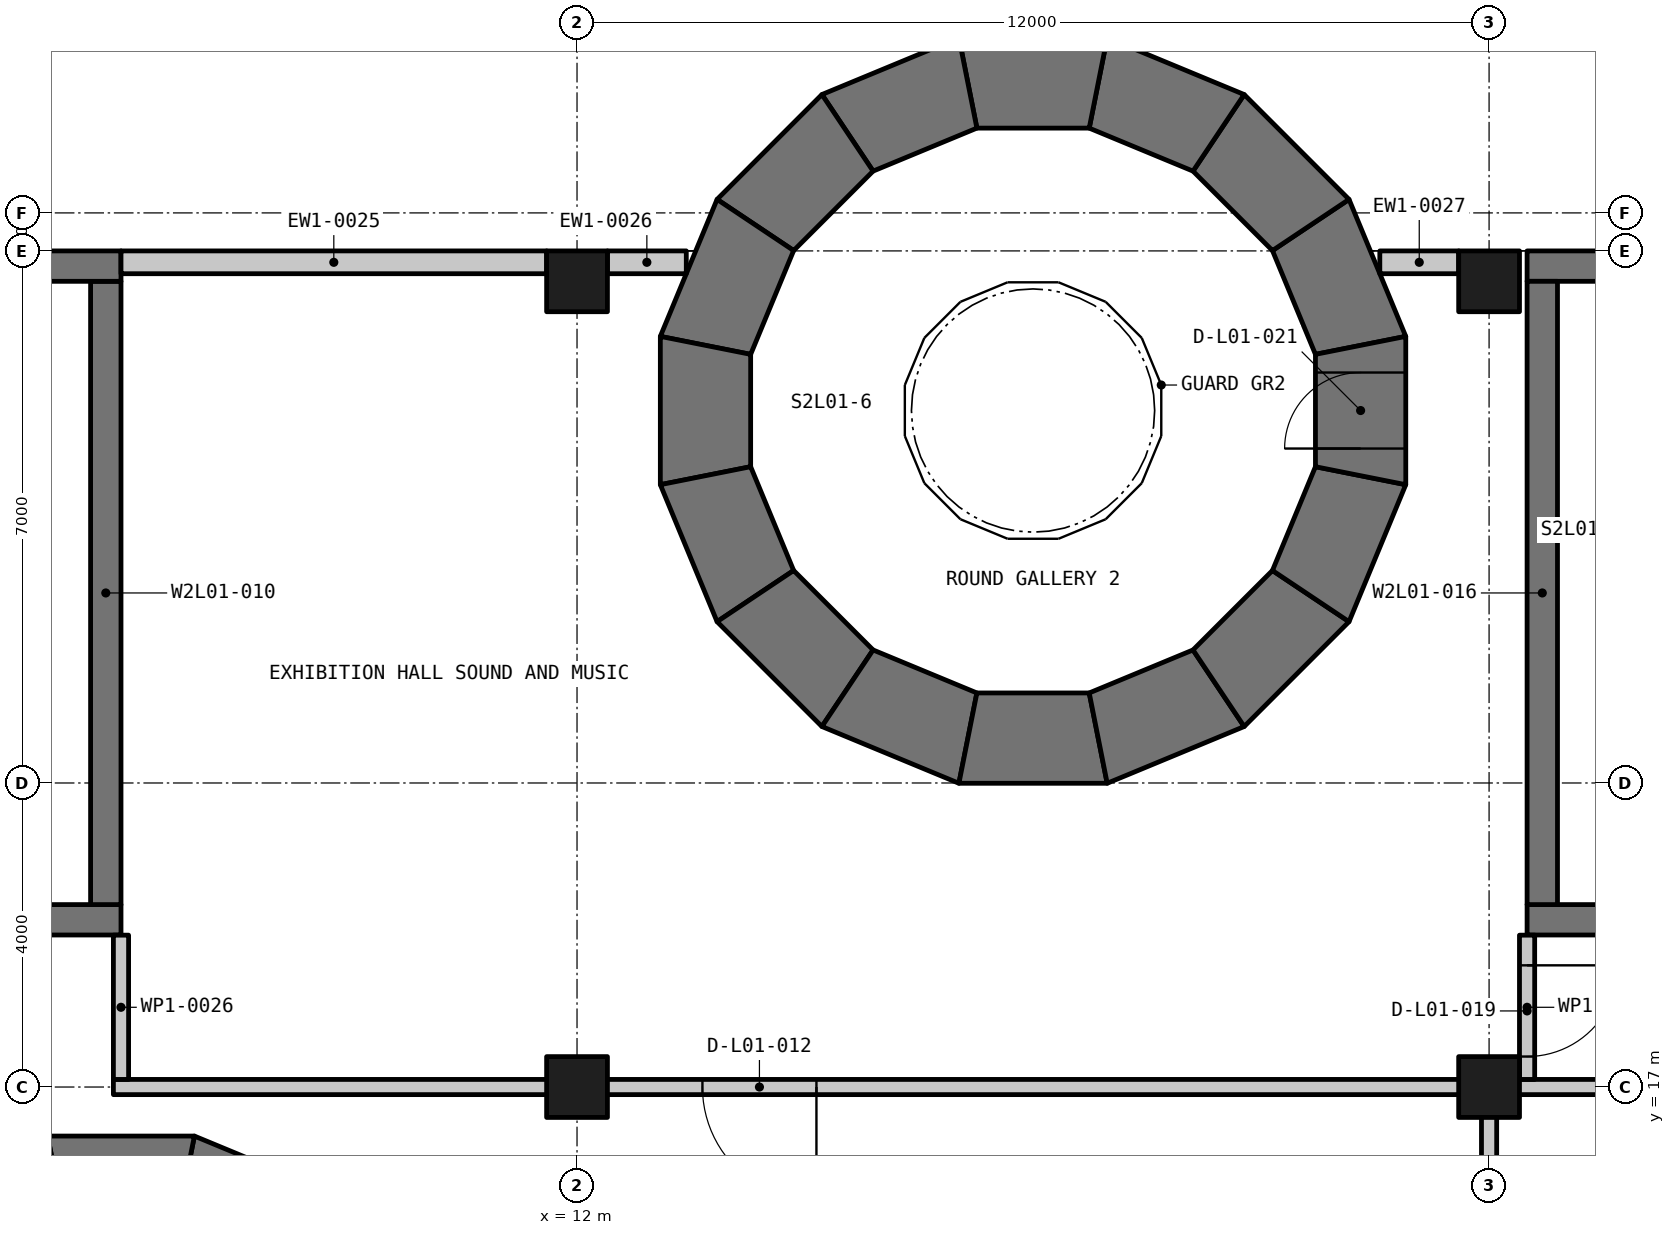
"""IFC4 building model, lengths in metres.
Left out: names, types, materials, properties, quantities, classifications, styles, units other than length and angle.
Written with IfcOpenShell. Run it as: python <this file> out.ifc"""

import sys

from ifc_helpers import new_model, si_unit, direction, frame, frame_2d, origin, origin_2d, place, context, subcontext, project, spatial, polyline, rectangle, outline, extrude, element, fill, save


model = new_model("IFC4")
c1 = context("Model", 3, precision=1e-05, world=origin(), true_north=direction((0.0, 1.0)))
c2 = subcontext(c1, "Body", "Model", "MODEL_VIEW")
j1 = project(units=[si_unit("LENGTHUNIT", "METRE"), si_unit("PLANEANGLEUNIT", "RADIAN")], contexts=[c1])
p1 = place(None, origin())
s1 = spatial("IfcSite", under=j1, at=p1, CompositionType="ELEMENT")
p2 = place(p1, origin())
s2 = spatial("IfcBuilding", under=s1, at=p2, CompositionType="ELEMENT")
p3 = place(p2, frame((0.0, 0.0, 6.0)))
s3 = spatial("IfcBuildingStorey", under=s2, at=p3, CompositionType="ELEMENT", Elevation=6.0)
for number, where, z_axis, x_axis in (
    (1, (12.0, 17.0, -0.3), (0.0, 0.0, 1.0), (1.0, 0.0, 0.0)),
    (2, (12.0, 27.6, -0.3), (0.0, 0.0, 1.0), (1.0, 0.0, 0.0)),
    (3, (24.0, 17.0, -0.3), (0.0, 0.0, 1.0), (1.0, 0.0, 0.0)),
    (4, (24.0, 27.6, -0.3), (0.0, 0.0, 1.0), (1.0, 0.0, 0.0)),
):
    element("IfcColumn", number, at=place(p3, frame(where, z_axis=z_axis, x_axis=x_axis)), inside=s3, PredefinedType="COLUMN", context=c2, shape_type="SweptSolid", body=[
        extrude(rectangle(XDim=0.8, YDim=0.8, at=origin_2d()), origin(), (0.0, 0.0, 1.0), 5.25),
    ])
p4 = place(p3, frame((8.635, 15.339, -0.3), z_axis=(0.0, 0.0, 1.0), x_axis=(-0.923901292417, 0.382630895081, 0.0)))
e5 = element("IfcWall", 5, at=p4, inside=s3, PredefinedType="SHEAR", context=c2, shape_type="SweptSolid", body=[
    extrude(outline(polyline([(0.0, -0.3), (1.931, -0.3), (1.812, 0.3), (0.119, 0.3), (0.0, -0.3)])), origin(), (0.0, 0.0, 1.0), 5.25),
])
p5 = place(p3, frame((6.966, 16.055, -0.3), z_axis=(0.0, 0.0, 1.0), x_axis=(-1.0, 0.0, 0.0)))
e6 = element("IfcWall", 6, at=p5, inside=s3, PredefinedType="SHEAR", context=c2, shape_type="SweptSolid", body=[
    extrude(outline(polyline([(-0.0, -0.3), (1.931, -0.3), (1.812, 0.3), (0.119, 0.3), (-0.0, -0.3)])), origin(), (0.0, 0.0, 1.0), 5.25),
])
p6 = place(p3, frame((5.149, 16.078, -0.3), z_axis=(0.0, 0.0, 1.0), x_axis=(-0.923901292417, -0.382630895081, 0.0)))
e7 = element("IfcWall", 7, at=p6, inside=s3, PredefinedType="SHEAR", context=c2, shape_type="SweptSolid", body=[
    extrude(outline(polyline([(0.0, -0.3), (1.931, -0.3), (1.812, 0.3), (0.119, 0.3), (0.0, -0.3)])), origin(), (0.0, 0.0, 1.0), 5.25),
])
p7 = place(p3, frame((22.355, 26.648, -0.3), z_axis=(0.0, 0.0, 1.0), x_axis=(-0.382668614316, 0.923885670209, 0.0)))
e8 = element("IfcWall", 8, at=p7, inside=s3, PredefinedType="SHEAR", context=c2, shape_type="SweptSolid", body=[
    extrude(outline(polyline([(0.0, -0.594), (1.951, -0.594), (1.715, 0.594), (0.236, 0.594), (0.0, -0.594)])), origin(), (0.0, 0.0, 1.0), 5.25),
])
p8 = place(p3, frame((21.737, 28.258, -0.3), z_axis=(0.0, 0.0, 1.0), x_axis=(-0.707044208134, 0.707169348702, 0.0)))
e9 = element("IfcWall", 9, at=p8, inside=s3, PredefinedType="SHEAR", context=c2, shape_type="SweptSolid", body=[
    extrude(outline(polyline([(0.0, -0.594), (1.951, -0.594), (1.715, 0.594), (0.236, 0.594), (0.0, -0.594)])), origin(), (0.0, 0.0, 1.0), 5.25),
])
p9 = place(p3, frame((20.551, 29.508, -0.3), z_axis=(0.0, 0.0, 1.0), x_axis=(-0.923885670209, 0.382668614316, 0.0)))
e10 = element("IfcWall", 10, at=p9, inside=s3, PredefinedType="SHEAR", context=c2, shape_type="SweptSolid", body=[
    extrude(outline(polyline([(0.0, -0.594), (1.951, -0.594), (1.715, 0.594), (0.237, 0.594), (0.0, -0.594)])), origin(), (0.0, 0.0, 1.0), 5.25),
])
p10 = place(p3, frame((18.975, 30.21, -0.3), z_axis=(0.0, 0.0, 1.0), x_axis=(-1.0, 0.0, 0.0)))
e11 = element("IfcWall", 11, at=p10, inside=s3, PredefinedType="SHEAR", context=c2, shape_type="SweptSolid", body=[
    extrude(outline(polyline([(-0.0, -0.594), (1.951, -0.594), (1.714, 0.594), (0.236, 0.594), (-0.0, -0.594)])), origin(), (0.0, 0.0, 1.0), 5.25),
])
p11 = place(p3, frame((17.252, 30.255, -0.3), z_axis=(0.0, 0.0, 1.0), x_axis=(-0.923885670209, -0.382668614316, 0.0)))
e12 = element("IfcWall", 12, at=p11, inside=s3, PredefinedType="SHEAR", context=c2, shape_type="SweptSolid", body=[
    extrude(outline(polyline([(0.0, -0.594), (1.951, -0.594), (1.714, 0.594), (0.236, 0.594), (0.0, -0.594)])), origin(), (0.0, 0.0, 1.0), 5.25),
])
p12 = place(p3, frame((15.642, 29.637, -0.3), z_axis=(0.0, 0.0, 1.0), x_axis=(-0.707044208134, -0.707169348702, 0.0)))
e13 = element("IfcWall", 13, at=p12, inside=s3, PredefinedType="SHEAR", context=c2, shape_type="SweptSolid", body=[
    extrude(outline(polyline([(0.0, -0.594), (1.951, -0.594), (1.715, 0.594), (0.236, 0.594), (0.0, -0.594)])), origin(), (0.0, 0.0, 1.0), 5.25),
])
p13 = place(p3, frame((14.392, 28.45, -0.3), z_axis=(0.0, 0.0, 1.0), x_axis=(-0.382668614316, -0.923885670209, 0.0)))
e14 = element("IfcWall", 14, at=p13, inside=s3, PredefinedType="SHEAR", context=c2, shape_type="SweptSolid", body=[
    extrude(outline(polyline([(-0.0, -0.594), (1.951, -0.594), (1.715, 0.594), (0.236, 0.594), (-0.0, -0.594)])), origin(), (0.0, 0.0, 1.0), 5.25),
])
p14 = place(p3, frame((13.69, 26.875, -0.3), z_axis=(0.0, 0.0, 1.0), x_axis=(0.0, -1.0, 0.0)))
e15 = element("IfcWall", 15, at=p14, inside=s3, PredefinedType="SHEAR", context=c2, shape_type="SweptSolid", body=[
    extrude(outline(polyline([(0.0, -0.594), (1.951, -0.594), (1.715, 0.594), (0.237, 0.594), (0.0, -0.594)])), origin(), (0.0, 0.0, 1.0), 5.25),
])
p15 = place(p3, frame((13.645, 25.152, -0.3), z_axis=(0.0, 0.0, 1.0), x_axis=(0.382712860146, -0.923867342576, 0.0)))
e16 = element("IfcWall", 16, at=p15, inside=s3, PredefinedType="SHEAR", context=c2, shape_type="SweptSolid", body=[
    extrude(outline(polyline([(0.0, -0.594), (1.951, -0.594), (1.714, 0.594), (0.236, 0.594), (0.0, -0.594)])), origin(), (0.0, 0.0, 1.0), 5.25),
])
p16 = place(p3, frame((14.263, 23.542, -0.3), z_axis=(0.0, 0.0, 1.0), x_axis=(0.707106781187, -0.707106781187, 0.0)))
e17 = element("IfcWall", 17, at=p16, inside=s3, PredefinedType="SHEAR", context=c2, shape_type="SweptSolid", body=[
    extrude(outline(polyline([(0.0, -0.594), (1.951, -0.594), (1.714, 0.594), (0.236, 0.594), (0.0, -0.594)])), origin(), (0.0, 0.0, 1.0), 5.25),
])
p17 = place(p3, frame((15.449, 22.292, -0.3), z_axis=(0.0, 0.0, 1.0), x_axis=(0.923885670209, -0.382668614316, 0.0)))
e18 = element("IfcWall", 18, at=p17, inside=s3, PredefinedType="SHEAR", context=c2, shape_type="SweptSolid", body=[
    extrude(outline(polyline([(0.0, -0.594), (1.951, -0.594), (1.715, 0.594), (0.237, 0.594), (0.0, -0.594)])), origin(), (0.0, 0.0, 1.0), 5.25),
])
p18 = place(p3, frame((17.025, 21.59, -0.3), z_axis=(0.0, 0.0, 1.0), x_axis=(1.0, 0.0, 0.0)))
e19 = element("IfcWall", 19, at=p18, inside=s3, PredefinedType="SHEAR", context=c2, shape_type="SweptSolid", body=[
    extrude(outline(polyline([(-0.0, -0.594), (1.951, -0.594), (1.714, 0.594), (0.236, 0.594), (-0.0, -0.594)])), origin(), (0.0, 0.0, 1.0), 5.25),
])
p19 = place(p3, frame((18.748, 21.545, -0.3), z_axis=(0.0, 0.0, 1.0), x_axis=(0.923885670209, 0.382668614316, 0.0)))
e20 = element("IfcWall", 20, at=p19, inside=s3, PredefinedType="SHEAR", context=c2, shape_type="SweptSolid", body=[
    extrude(outline(polyline([(0.0, -0.594), (1.951, -0.594), (1.714, 0.594), (0.236, 0.594), (0.0, -0.594)])), origin(), (0.0, 0.0, 1.0), 5.25),
])
p20 = place(p3, frame((20.358, 22.163, -0.3), z_axis=(0.0, 0.0, 1.0), x_axis=(0.707106781187, 0.707106781187, 0.0)))
e21 = element("IfcWall", 21, at=p20, inside=s3, PredefinedType="SHEAR", context=c2, shape_type="SweptSolid", body=[
    extrude(outline(polyline([(0.0, -0.594), (1.951, -0.594), (1.715, 0.594), (0.236, 0.594), (0.0, -0.594)])), origin(), (0.0, 0.0, 1.0), 5.25),
])
p21 = place(p3, frame((21.608, 23.35, -0.3), z_axis=(0.0, 0.0, 1.0), x_axis=(0.382712860146, 0.923867342576, 0.0)))
e22 = element("IfcWall", 22, at=p21, inside=s3, PredefinedType="SHEAR", context=c2, shape_type="SweptSolid", body=[
    extrude(outline(polyline([(-0.0, -0.594), (1.951, -0.594), (1.714, 0.594), (0.236, 0.594), (-0.0, -0.594)])), origin(), (0.0, 0.0, 1.0), 5.25),
])
p22 = place(p3, frame((22.31, 24.925, -0.3), z_axis=(0.0, 0.0, 1.0), x_axis=(0.0, 1.0, 0.0)))
e23 = element("IfcWall", 23, at=p22, inside=s3, PredefinedType="SHEAR", context=c2, shape_type="SweptSolid", body=[
    extrude(outline(polyline([(0.0, -0.594), (1.951, -0.594), (1.714, 0.594), (0.236, 0.594), (0.0, -0.594)])), origin(), (0.0, 0.0, 1.0), 5.25),
])
p23 = place(p22, frame((0.475, 0.0, 0.3)))
e24 = element("IfcOpeningElement", 24, at=p23, cuts=e23, PredefinedType="OPENING", context=c2, shape_type="SweptSolid", body=[
    extrude(rectangle(XDim=1.0, YDim=2.2, at=frame_2d((0.5, 1.1))), frame((0.0, 0.604, 0.0), z_axis=(0.0, -1.0, 0.0), x_axis=(1.0, 0.0, 0.0)), (0.0, 0.0, 1.0), 1.208),
])
p24 = place(p3, frame((0.0, 19.2, -0.3), z_axis=(0.0, 0.0, 1.0), x_axis=(1.0, 0.0, 0.0)))
e25 = element("IfcWall", 25, at=p24, inside=s3, PredefinedType="SHEAR", context=c2, shape_type="SweptSolid", body=[
    extrude(rectangle(XDim=6.0, YDim=0.4, at=frame_2d((3.0, 0.0))), origin(), (0.0, 0.0, 1.0), 5.25),
])
p25 = place(p24, frame((2.399, 0.0, 0.3)))
e26 = element("IfcOpeningElement", 26, at=p25, cuts=e25, PredefinedType="OPENING", context=c2, shape_type="SweptSolid", body=[
    extrude(rectangle(XDim=1.2, YDim=2.2, at=frame_2d((0.6, 1.1))), frame((0.0, 0.21, 0.0), z_axis=(0.0, -1.0, 0.0), x_axis=(1.0, 0.0, 0.0)), (0.0, 0.0, 1.0), 0.42),
])
p26 = place(p3, frame((5.8, 19.4, -0.3), z_axis=(0.0, 0.0, 1.0), x_axis=(0.0, 1.0, 0.0)))
e27 = element("IfcWall", 27, at=p26, inside=s3, PredefinedType="SHEAR", context=c2, shape_type="SweptSolid", body=[
    extrude(rectangle(XDim=8.2, YDim=0.4, at=frame_2d((4.1, 0.0))), origin(), (0.0, 0.0, 1.0), 5.25),
])
p27 = place(p3, frame((0.0, 27.8, -0.3), z_axis=(0.0, 0.0, 1.0), x_axis=(1.0, 0.0, 0.0)))
e28 = element("IfcWall", 28, at=p27, inside=s3, PredefinedType="SHEAR", context=c2, shape_type="SweptSolid", body=[
    extrude(rectangle(XDim=6.0, YDim=0.4, at=frame_2d((3.0, 0.0))), origin(), (0.0, 0.0, 1.0), 5.25),
])
for number, where, z_axis, x_axis in (
    (29, (24.5, 19.2, -0.3), (0.0, 0.0, 1.0), (1.0, 0.0, 0.0)),
    (30, (24.5, 27.8, -0.3), (0.0, 0.0, 1.0), (1.0, 0.0, 0.0)),
):
    element("IfcWall", number, at=place(p3, frame(where, z_axis=z_axis, x_axis=x_axis)), inside=s3, PredefinedType="SHEAR", context=c2, shape_type="SweptSolid", body=[
        extrude(rectangle(XDim=5.5, YDim=0.4, at=frame_2d((2.75, 0.0))), origin(), (0.0, 0.0, 1.0), 5.25),
    ])
p28 = place(p3, frame((24.7, 19.4, -0.3), z_axis=(0.0, 0.0, 1.0), x_axis=(0.0, 1.0, 0.0)))
e31 = element("IfcWall", 31, at=p28, inside=s3, PredefinedType="SHEAR", context=c2, shape_type="SweptSolid", body=[
    extrude(rectangle(XDim=8.2, YDim=0.4, at=frame_2d((4.1, 0.0))), origin(), (0.0, 0.0, 1.0), 5.25),
])
p29 = place(p3, frame((6.0, 27.85, 0.0), z_axis=(0.0, 0.0, 1.0), x_axis=(1.0, 0.0, 0.0)))
e32 = element("IfcWall", 32, at=p29, inside=s3, PredefinedType="SOLIDWALL", context=c2, shape_type="SweptSolid", body=[
    extrude(rectangle(XDim=5.6, YDim=0.3, at=frame_2d((2.8, 0.0))), origin(), (0.0, 0.0, 1.0), 4.05),
])
for number, where, z_axis, x_axis in (
    (33, (12.4, 27.85, 0.0), (0.0, 0.0, 1.0), (1.0, 0.0, 0.0)),
    (34, (22.562, 27.85, 0.0), (0.0, 0.0, 1.0), (1.0, 0.0, 0.0)),
):
    element("IfcWall", number, at=place(p3, frame(where, z_axis=z_axis, x_axis=x_axis)), inside=s3, PredefinedType="SOLIDWALL", context=c2, shape_type="SweptSolid", body=[
        extrude(rectangle(XDim=1.038, YDim=0.3, at=frame_2d((0.519, 0.0))), origin(), (0.0, 0.0, 1.0), 4.05),
    ])
p30 = place(p3, frame((65.9, 17.0, 0.0), z_axis=(0.0, 0.0, 1.0), x_axis=(-1.0, 0.0, 0.0)))
e35 = element("IfcWall", 35, at=p30, inside=s3, PredefinedType="PARTITIONING", context=c2, shape_type="SweptSolid", body=[
    extrude(rectangle(XDim=60.0, YDim=0.2, at=frame_2d((30.0, 0.0))), origin(), (0.0, 0.0, 1.0), 4.05),
])
p31 = place(p30, frame((50.75, 0.0, 0.0)))
e36 = element("IfcOpeningElement", 36, at=p31, cuts=e35, PredefinedType="OPENING", context=c2, shape_type="SweptSolid", body=[
    extrude(rectangle(XDim=1.5, YDim=2.1, at=frame_2d((0.75, 1.05))), frame((0.0, 0.11, 0.0), z_axis=(0.0, -1.0, 0.0), x_axis=(1.0, 0.0, 0.0)), (0.0, 0.0, 1.0), 0.22),
])
p32 = place(p30, frame((37.401, 0.0, 0.0)))
e37 = element("IfcOpeningElement", 37, at=p32, cuts=e35, PredefinedType="OPENING", context=c2, shape_type="SweptSolid", body=[
    extrude(rectangle(XDim=2.0, YDim=2.1, at=frame_2d((1.0, 1.05))), frame((0.0, 0.11, 0.0), z_axis=(0.0, -1.0, 0.0), x_axis=(1.0, 0.0, 0.0)), (0.0, 0.0, 1.0), 0.22),
])
p33 = place(p30, frame((11.15, 0.0, 0.0)))
e38 = element("IfcOpeningElement", 38, at=p33, cuts=e35, PredefinedType="OPENING", context=c2, shape_type="SweptSolid", body=[
    extrude(rectangle(XDim=1.5, YDim=2.1, at=frame_2d((0.75, 1.05))), frame((0.0, 0.11, 0.0), z_axis=(0.0, -1.0, 0.0), x_axis=(1.0, 0.0, 0.0)), (0.0, 0.0, 1.0), 0.22),
])
p34 = place(p30, frame((2.251, 0.0, 0.0)))
e39 = element("IfcOpeningElement", 39, at=p34, cuts=e35, PredefinedType="OPENING", context=c2, shape_type="SweptSolid", body=[
    extrude(rectangle(XDim=2.0, YDim=2.1, at=frame_2d((1.0, 1.05))), frame((0.0, 0.11, 0.0), z_axis=(0.0, -1.0, 0.0), x_axis=(1.0, 0.0, 0.0)), (0.0, 0.0, 1.0), 0.22),
])
p35 = place(p3, frame((24.5, 18.998, 0.0), z_axis=(0.0, 0.0, 1.0), x_axis=(0.0, -1.0, 0.0)))
e40 = element("IfcWall", 40, at=p35, inside=s3, PredefinedType="PARTITIONING", context=c2, shape_type="SweptSolid", body=[
    extrude(rectangle(XDim=1.898, YDim=0.2, at=frame_2d((0.949, 0.0))), origin(), (0.0, 0.0, 1.0), 4.05),
])
p36 = place(p35, frame((0.397, 0.0, 0.0)))
e41 = element("IfcOpeningElement", 41, at=p36, cuts=e40, PredefinedType="OPENING", context=c2, shape_type="SweptSolid", body=[
    extrude(rectangle(XDim=1.2, YDim=2.1, at=frame_2d((0.6, 1.05))), frame((0.0, 0.11, 0.0), z_axis=(0.0, -1.0, 0.0), x_axis=(1.0, 0.0, 0.0)), (0.0, 0.0, 1.0), 0.22),
])
p37 = place(p3, frame((24.0, 6.2, 0.0), z_axis=(0.0, 0.0, 1.0), x_axis=(0.0, 1.0, 0.0)))
e42 = element("IfcWall", 42, at=p37, inside=s3, PredefinedType="PARTITIONING", context=c2, shape_type="SweptSolid", body=[
    extrude(rectangle(XDim=10.7, YDim=0.2, at=frame_2d((5.35, 0.0))), origin(), (0.0, 0.0, 1.0), 4.05),
])
p38 = place(p3, frame((6.0, 17.1, 0.0), z_axis=(0.0, 0.0, 1.0), x_axis=(0.0, 1.0, 0.0)))
e43 = element("IfcWall", 43, at=p38, inside=s3, PredefinedType="PARTITIONING", context=c2, shape_type="SweptSolid", body=[
    extrude(rectangle(XDim=1.898, YDim=0.2, at=frame_2d((0.949, 0.0))), origin(), (0.0, 0.0, 1.0), 4.05),
])
p39 = place(p31, origin())
e44 = element("IfcDoor", 44, at=p39, inside=s3, OperationType="DOUBLE_DOOR_SINGLE_SWING", PredefinedType="DOOR", context=c2, shape_type="SweptSolid", body=[
    extrude(rectangle(XDim=1.5, YDim=2.1, at=frame_2d((0.75, 1.05))), frame((0.0, 0.025, 0.0), z_axis=(0.0, -1.0, 0.0), x_axis=(1.0, 0.0, 0.0)), (0.0, 0.0, 1.0), 0.05),
])
fill(e36, e44)
p40 = place(p36, origin())
e45 = element("IfcDoor", 45, at=p40, inside=s3, OperationType="SINGLE_SWING_LEFT", PredefinedType="DOOR", context=c2, shape_type="SweptSolid", body=[
    extrude(rectangle(XDim=1.2, YDim=2.1, at=frame_2d((0.6, 1.05))), frame((0.0, 0.025, 0.0), z_axis=(0.0, -1.0, 0.0), x_axis=(1.0, 0.0, 0.0)), (0.0, 0.0, 1.0), 0.05),
])
fill(e41, e45)
p41 = place(p23, origin())
e46 = element("IfcDoor", 46, at=p41, inside=s3, OperationType="SINGLE_SWING_RIGHT", PredefinedType="DOOR", context=c2, shape_type="SweptSolid", body=[
    extrude(rectangle(XDim=1.0, YDim=2.2, at=frame_2d((0.5, 1.1))), frame((0.0, 0.025, 0.0), z_axis=(0.0, -1.0, 0.0), x_axis=(1.0, 0.0, 0.0)), (0.0, 0.0, 1.0), 0.05),
])
fill(e24, e46)
save(model, sys.argv[1])
